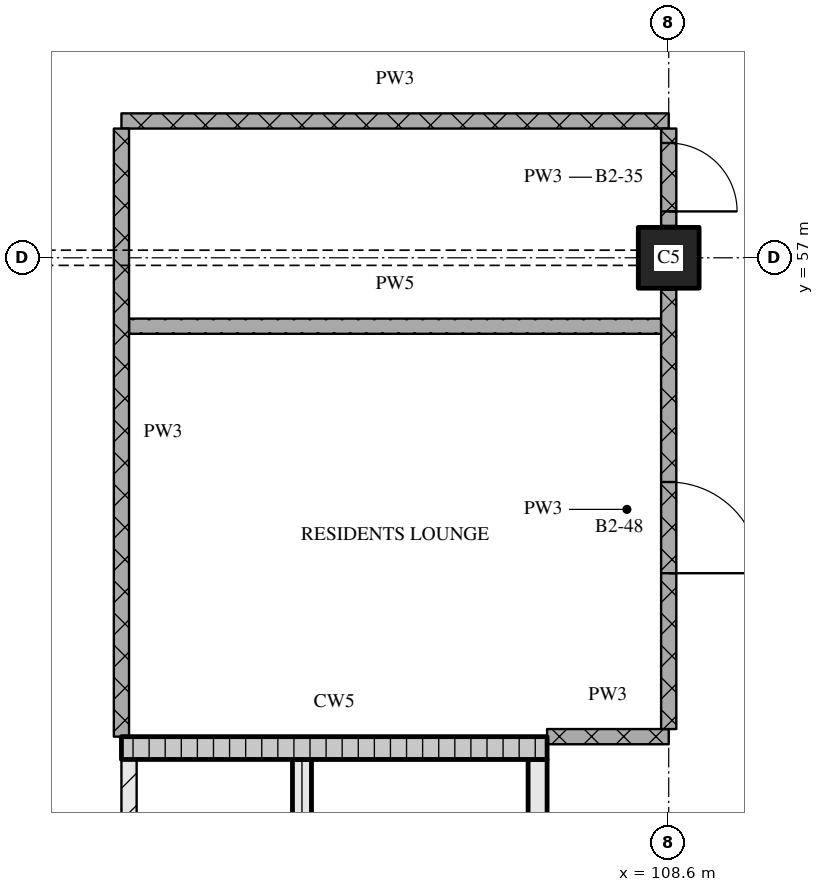
"""IFC4 building model, lengths in metres.
Left out: names, types, materials, properties, quantities, classifications, styles, units other than length and angle.
Written with IfcOpenShell. Run it as: python <this file> out.ifc"""

import sys

from ifc_helpers import new_model, si_unit, direction, frame, frame_2d, origin, origin_2d, place, context, subcontext, project, spatial, rectangle, extrude, element, fill, save


model = new_model("IFC4")
c1 = context("Model", 3, precision=1e-05, world=origin(), true_north=direction((0.0, 1.0)))
c2 = subcontext(c1, "Body", "Model", "MODEL_VIEW")
j1 = project(units=[si_unit("LENGTHUNIT", "METRE"), si_unit("PLANEANGLEUNIT", "RADIAN")], contexts=[c1])
p1 = place(None, origin())
s1 = spatial("IfcSite", under=j1, at=p1, CompositionType="ELEMENT")
p2 = place(p1, origin())
s2 = spatial("IfcBuilding", under=s1, at=p2, CompositionType="ELEMENT")
p3 = place(p2, frame((0.0, 0.0, 109.65)))
s3 = spatial("IfcBuildingStorey", under=s2, at=p3, CompositionType="ELEMENT", Elevation=109.65)
p4 = place(p3, frame((108.6, 57.0, 0.0), z_axis=(0.0, 0.0, 1.0), x_axis=(1.0, 0.0, 0.0)))
e1 = element("IfcColumn", 1, at=p4, inside=s3, PredefinedType="COLUMN", context=c2, shape_type="SweptSolid", body=[
    extrude(rectangle(XDim=0.8, YDim=0.8, at=origin_2d()), origin(), (0.0, 0.0, 1.0), 3.6),
])
p5 = place(p3, frame((101.5, 43.5, 0.0), z_axis=(0.0, 0.0, 1.0), x_axis=(0.0, 1.0, 0.0)))
e2 = element("IfcWall", 2, at=p5, inside=s3, PredefinedType="PARTITIONING", context=c2, shape_type="SweptSolid", body=[
    extrude(rectangle(XDim=6.9, YDim=0.2, at=frame_2d((3.45, 0.0))), origin(), (0.0, 0.0, 1.0), 3.32),
])
p6 = place(p5, frame((1.0, 0.0, 0.0)))
e3 = element("IfcOpeningElement", 3, at=p6, cuts=e2, PredefinedType="OPENING", context=c2, shape_type="SweptSolid", body=[
    extrude(rectangle(XDim=1.0, YDim=2.1, at=frame_2d((0.5, 1.05))), frame((0.0, 0.11, 0.0), z_axis=(0.0, -1.0, 0.0), x_axis=(1.0, 0.0, 0.0)), (0.0, 0.0, 1.0), 0.22),
])
p7 = place(p3, frame((103.775, 43.5, 0.0), z_axis=(0.0, 0.0, 1.0), x_axis=(0.0, 1.0, 0.0)))
e4 = element("IfcWall", 4, at=p7, inside=s3, PredefinedType="SOLIDWALL", context=c2, shape_type="SweptSolid", body=[
    extrude(rectangle(XDim=6.9, YDim=0.25, at=frame_2d((3.45, 0.0))), origin(), (0.0, 0.0, 1.0), 3.32),
])
p8 = place(p7, frame((0.2, 0.0, 0.0)))
e5 = element("IfcOpeningElement", 5, at=p8, cuts=e4, PredefinedType="OPENING", context=c2, shape_type="SweptSolid", body=[
    extrude(rectangle(XDim=1.0, YDim=2.1, at=frame_2d((0.5, 1.05))), frame((0.0, 0.135, 0.0), z_axis=(0.0, -1.0, 0.0), x_axis=(1.0, 0.0, 0.0)), (0.0, 0.0, 1.0), 0.27),
])
p9 = place(p3, frame((106.875, 43.5, 0.0), z_axis=(0.0, 0.0, 1.0), x_axis=(0.0, 1.0, 0.0)))
e6 = element("IfcWall", 6, at=p9, inside=s3, PredefinedType="SOLIDWALL", context=c2, shape_type="SweptSolid", body=[
    extrude(rectangle(XDim=6.9, YDim=0.25, at=frame_2d((3.45, 0.0))), origin(), (0.0, 0.0, 1.0), 3.32),
])
p10 = place(p3, frame((101.4, 50.55, 0.0), z_axis=(0.0, 0.0, 1.0), x_axis=(1.0, 0.0, 0.0)))
e7 = element("IfcWall", 7, at=p10, inside=s3, PredefinedType="SOLIDWALL", context=c2, shape_type="SweptSolid", body=[
    extrude(rectangle(XDim=5.6, YDim=0.3, at=frame_2d((2.8, 0.0))), origin(), (0.0, 0.0, 1.0), 3.32),
])
p11 = place(p3, frame((107.0, 50.7, 0.0), z_axis=(0.0, 0.0, 1.0), x_axis=(1.0, 0.0, 0.0)))
e8 = element("IfcWall", 8, at=p11, inside=s3, PredefinedType="PARTITIONING", context=c2, shape_type="SweptSolid", body=[
    extrude(rectangle(XDim=1.6, YDim=0.2, at=frame_2d((0.8, 0.0))), origin(), (0.0, 0.0, 1.0), 3.32),
])
p12 = place(p3, frame((101.5, 56.1, 0.0), z_axis=(0.0, 0.0, 1.0), x_axis=(1.0, 0.0, 0.0)))
e9 = element("IfcWall", 9, at=p12, inside=s3, PredefinedType="PARTITIONING", context=c2, shape_type="SweptSolid", body=[
    extrude(rectangle(XDim=7.0, YDim=0.2, at=frame_2d((3.5, 0.0))), origin(), (0.0, 0.0, 1.0), 3.32),
])
p13 = place(p3, frame((101.4, 58.8, 0.0), z_axis=(0.0, 0.0, 1.0), x_axis=(1.0, 0.0, 0.0)))
e10 = element("IfcWall", 10, at=p13, inside=s3, PredefinedType="PARTITIONING", context=c2, shape_type="SweptSolid", body=[
    extrude(rectangle(XDim=7.2, YDim=0.2, at=frame_2d((3.6, 0.0))), origin(), (0.0, 0.0, 1.0), 3.32),
])
p14 = place(p3, frame((101.4, 58.7, 0.0), z_axis=(0.0, 0.0, 1.0), x_axis=(0.0, -1.0, 0.0)))
e11 = element("IfcWall", 11, at=p14, inside=s3, PredefinedType="PARTITIONING", context=c2, shape_type="SweptSolid", body=[
    extrude(rectangle(XDim=8.0, YDim=0.2, at=frame_2d((4.0, 0.0))), origin(), (0.0, 0.0, 1.0), 3.32),
])
p15 = place(p3, frame((108.6, 50.8, 0.0), z_axis=(0.0, 0.0, 1.0), x_axis=(0.0, 1.0, 0.0)))
e12 = element("IfcWall", 12, at=p15, inside=s3, PredefinedType="PARTITIONING", context=c2, shape_type="SweptSolid", body=[
    extrude(rectangle(XDim=5.78, YDim=0.2, at=frame_2d((2.89, 0.0))), origin(), (0.0, 0.0, 1.0), 3.32),
])
p16 = place(p15, frame((2.05, 0.0, 0.0)))
e13 = element("IfcOpeningElement", 13, at=p16, cuts=e12, PredefinedType="OPENING", context=c2, shape_type="SweptSolid", body=[
    extrude(rectangle(XDim=1.2, YDim=2.1, at=frame_2d((0.6, 1.05))), frame((0.0, 0.11, 0.0), z_axis=(0.0, -1.0, 0.0), x_axis=(1.0, 0.0, 0.0)), (0.0, 0.0, 1.0), 0.22),
])
p17 = place(p3, frame((108.6, 57.42, 0.0), z_axis=(0.0, 0.0, 1.0), x_axis=(0.0, 1.0, 0.0)))
e14 = element("IfcWall", 14, at=p17, inside=s3, PredefinedType="PARTITIONING", context=c2, shape_type="SweptSolid", body=[
    extrude(rectangle(XDim=1.28, YDim=0.2, at=frame_2d((0.64, 0.0))), origin(), (0.0, 0.0, 1.0), 3.32),
])
p18 = place(p17, frame((0.19, 0.0, 0.0)))
e15 = element("IfcOpeningElement", 15, at=p18, cuts=e14, PredefinedType="OPENING", context=c2, shape_type="SweptSolid", body=[
    extrude(rectangle(XDim=0.9, YDim=2.1, at=frame_2d((0.45, 1.05))), frame((0.0, 0.11, 0.0), z_axis=(0.0, -1.0, 0.0), x_axis=(1.0, 0.0, 0.0)), (0.0, 0.0, 1.0), 0.22),
])
p19 = place(p16, origin())
e16 = element("IfcDoor", 16, at=p19, inside=s3, OperationType="SINGLE_SWING_RIGHT", PredefinedType="DOOR", context=c2, shape_type="SweptSolid", body=[
    extrude(rectangle(XDim=1.2, YDim=2.1, at=frame_2d((0.6, 1.05))), frame((0.0, 0.025, 0.0), z_axis=(0.0, -1.0, 0.0), x_axis=(1.0, 0.0, 0.0)), (0.0, 0.0, 1.0), 0.05),
])
fill(e13, e16)
p20 = place(p18, origin())
e17 = element("IfcDoor", 17, at=p20, inside=s3, OperationType="SINGLE_SWING_RIGHT", PredefinedType="DOOR", context=c2, shape_type="SweptSolid", body=[
    extrude(rectangle(XDim=0.9, YDim=2.1, at=frame_2d((0.45, 1.05))), frame((0.0, 0.025, 0.0), z_axis=(0.0, -1.0, 0.0), x_axis=(1.0, 0.0, 0.0)), (0.0, 0.0, 1.0), 0.05),
])
fill(e15, e17)
save(model, sys.argv[1])
